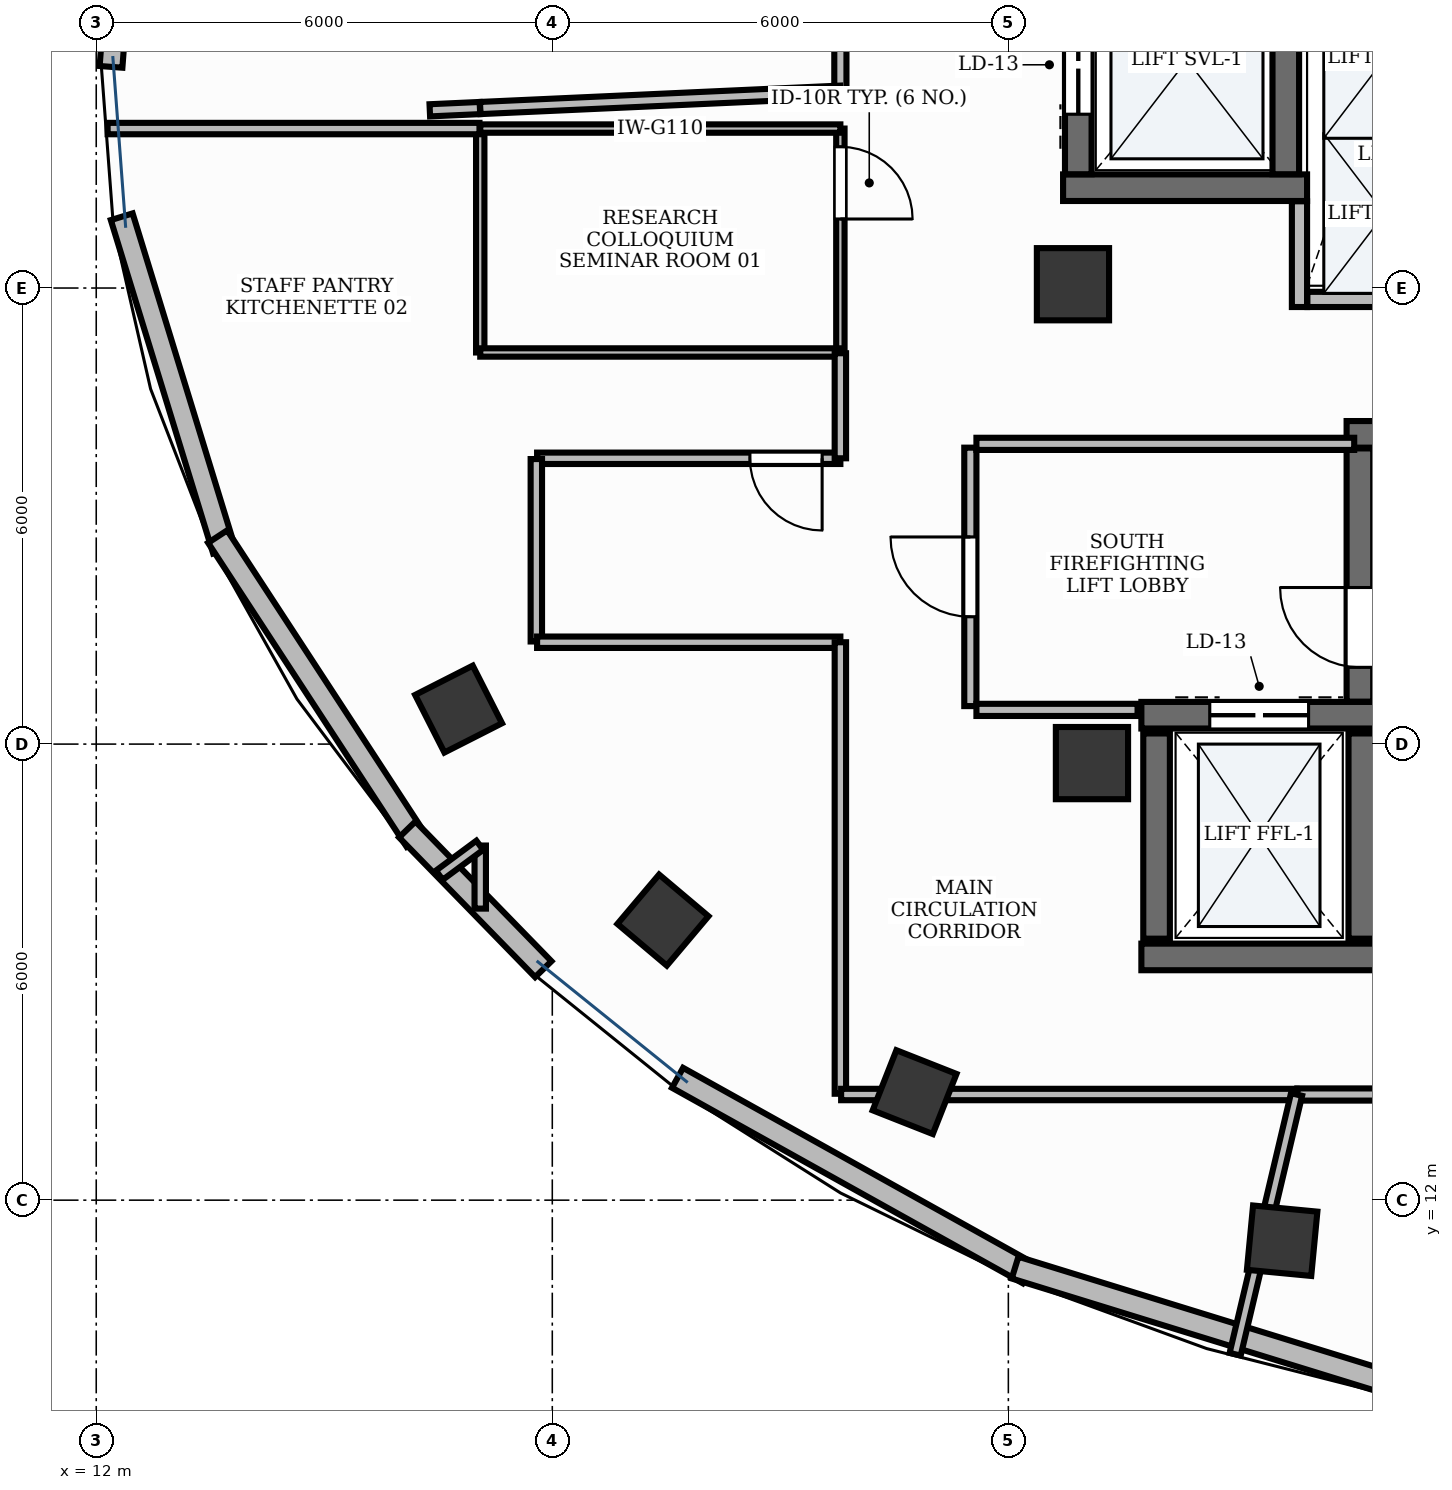
"""IFC4 building model, lengths in metres.
Left out: names, types, materials, properties, quantities, classifications, styles, units other than length and angle.
Written with IfcOpenShell. Run it as: python <this file> out.ifc"""

import sys

from ifc_helpers import new_model, si_unit, direction, frame, frame_2d, origin, origin_2d, place, context, subcontext, project, spatial, rectangle, extrude, element, fill, save


model = new_model("IFC4")
c1 = context("Model", 3, precision=1e-05, world=origin(), true_north=direction((0.0, 1.0)))
c2 = subcontext(c1, "Body", "Model", "MODEL_VIEW")
j1 = project(units=[si_unit("LENGTHUNIT", "METRE"), si_unit("PLANEANGLEUNIT", "RADIAN")], contexts=[c1])
p1 = place(None, origin())
s1 = spatial("IfcSite", under=j1, at=p1, CompositionType="ELEMENT")
p2 = place(p1, origin())
s2 = spatial("IfcBuilding", under=s1, at=p2, CompositionType="ELEMENT")
p3 = place(p2, frame((0.0, 0.0, 310.2)))
s3 = spatial("IfcBuildingStorey", under=s2, at=p3, CompositionType="ELEMENT", Elevation=310.2)
p4 = place(p3, frame((28.45, 22.075, 0.0), z_axis=(0.0, 0.0, 1.0), x_axis=(1.0, 0.0, 0.0)))
e1 = element("IfcWall", 1, at=p4, inside=s3, PredefinedType="SHEAR", context=c2, shape_type="SweptSolid", body=[
    extrude(rectangle(XDim=8.55, YDim=0.35, at=frame_2d((4.275, 0.0))), origin(), (0.0, 0.0, 1.0), 3.9),
])
p5 = place(p3, frame((28.625, 18.557, 0.0), z_axis=(0.0, 0.0, 1.0), x_axis=(0.0, 1.0, 0.0)))
e2 = element("IfcWall", 2, at=p5, inside=s3, PredefinedType="SHEAR", context=c2, shape_type="SweptSolid", body=[
    extrude(rectangle(XDim=3.333, YDim=0.35, at=frame_2d((1.667, 0.0))), origin(), (0.0, 0.0, 1.0), 3.9),
])
p6 = place(p5, frame((0.453, 0.0, 0.0)))
e3 = element("IfcOpeningElement", 3, at=p6, cuts=e2, PredefinedType="OPENING", context=c2, shape_type="SweptSolid", body=[
    extrude(rectangle(XDim=1.05, YDim=2.15, at=frame_2d((0.525, 1.075))), frame((0.0, 0.19, 0.0), z_axis=(0.0, -1.0, 0.0), x_axis=(1.0, 0.0, 0.0)), (0.0, 0.0, 1.0), 0.38),
])
p7 = place(p3, frame((25.75, 15.2, 0.0), z_axis=(0.0, 0.0, 1.0), x_axis=(1.0, 0.0, 0.0)))
e4 = element("IfcWall", 4, at=p7, inside=s3, PredefinedType="SHEAR", context=c2, shape_type="SweptSolid", body=[
    extrude(rectangle(XDim=3.1, YDim=0.35, at=frame_2d((1.55, 0.0))), origin(), (0.0, 0.0, 1.0), 3.9),
])
p8 = place(p3, frame((25.75, 18.38, 0.0), z_axis=(0.0, 0.0, 1.0), x_axis=(1.0, 0.0, 0.0)))
e5 = element("IfcWall", 5, at=p8, inside=s3, PredefinedType="SHEAR", context=c2, shape_type="SweptSolid", body=[
    extrude(rectangle(XDim=3.1, YDim=0.35, at=frame_2d((1.55, 0.0))), origin(), (0.0, 0.0, 1.0), 3.9),
])
p9 = place(p8, frame((0.9, 0.0, 0.0)))
e6 = element("IfcOpeningElement", 6, at=p9, cuts=e5, PredefinedType="OPENING", context=c2, shape_type="SweptSolid", body=[
    extrude(rectangle(XDim=1.3, YDim=2.2, at=frame_2d((0.65, 1.1))), frame((0.0, 0.19, 0.0), z_axis=(0.0, -1.0, 0.0), x_axis=(1.0, 0.0, 0.0)), (0.0, 0.0, 1.0), 0.38),
])
for number, where, z_axis, x_axis in (
    (7, (25.95, 15.44, 0.0), (0.0, 0.0, 1.0), (0.0, 1.0, 0.0)),
    (8, (28.65, 15.44, 0.0), (0.0, 0.0, 1.0), (0.0, 1.0, 0.0)),
):
    element("IfcWall", number, at=place(p3, frame(where, z_axis=z_axis, x_axis=x_axis)), inside=s3, PredefinedType="SHEAR", context=c2, shape_type="SweptSolid", body=[
        extrude(rectangle(XDim=2.7, YDim=0.35, at=frame_2d((1.35, 0.0))), origin(), (0.0, 0.0, 1.0), 3.9),
    ])
p10 = place(p3, frame((24.72, 25.32, 0.0), z_axis=(0.0, 0.0, 1.0), x_axis=(1.0, 0.0, 0.0)))
e9 = element("IfcWall", 9, at=p10, inside=s3, PredefinedType="SHEAR", context=c2, shape_type="SweptSolid", body=[
    extrude(rectangle(XDim=3.21, YDim=0.35, at=frame_2d((1.605, 0.0))), origin(), (0.0, 0.0, 1.0), 3.9),
])
p11 = place(p3, frame((24.92, 25.497, 0.0), z_axis=(0.0, 0.0, 1.0), x_axis=(0.0, 1.0, 0.0)))
e10 = element("IfcWall", 10, at=p11, inside=s3, PredefinedType="SHEAR", context=c2, shape_type="SweptSolid", body=[
    extrude(rectangle(XDim=3.006, YDim=0.35, at=frame_2d((1.503, 0.0))), origin(), (0.0, 0.0, 1.0), 3.9),
])
p12 = place(p11, frame((0.79, 0.0, 0.0)))
e11 = element("IfcOpeningElement", 11, at=p12, cuts=e10, PredefinedType="OPENING", context=c2, shape_type="SweptSolid", body=[
    extrude(rectangle(XDim=1.3, YDim=2.2, at=frame_2d((0.65, 1.1))), frame((0.0, 0.19, 0.0), z_axis=(0.0, -1.0, 0.0), x_axis=(1.0, 0.0, 0.0)), (0.0, 0.0, 1.0), 0.38),
])
p13 = place(p3, frame((27.65, 25.497, 0.0), z_axis=(0.0, 0.0, 1.0), x_axis=(0.0, 1.0, 0.0)))
e12 = element("IfcWall", 12, at=p13, inside=s3, PredefinedType="SHEAR", context=c2, shape_type="SweptSolid", body=[
    extrude(rectangle(XDim=3.006, YDim=0.35, at=frame_2d((1.503, 0.0))), origin(), (0.0, 0.0, 1.0), 3.9),
])
for number, where, z_axis, x_axis in (
    (13, (24.85, 24.05, -0.0), (0.0, 0.0, 1.0), (1.0, 0.0, 0.0)),
    (14, (25.1, 17.75, -0.0), (0.0, 0.0, 1.0), (1.0, 0.0, 0.0)),
):
    element("IfcColumn", number, at=place(p3, frame(where, z_axis=z_axis, x_axis=x_axis)), inside=s3, PredefinedType="PILASTER", context=c2, shape_type="SweptSolid", body=[
        extrude(rectangle(XDim=0.95, YDim=0.95, at=origin_2d()), origin(), (0.0, 0.0, 1.0), 3.901),
    ])
for number, where, z_axis, x_axis in (
    (15, (16.767, 18.46, -0.0), (0.0, 0.0, 1.0), (-0.453, 0.891, 0.0)),
    (16, (19.456, 15.685, -0.0), (0.0, 0.0, 1.0), (-0.764, 0.645, 0.0)),
    (17, (22.766, 13.421, -0.0), (0.0, 0.0, 1.0), (-0.93, 0.367, 0.0)),
    (18, (27.602, 11.466, -0.0), (0.0, 0.0, 1.0), (-0.995, 0.095, 0.0)),
):
    element("IfcColumn", number, at=place(p3, frame(where, z_axis=z_axis, x_axis=x_axis)), inside=s3, PredefinedType="COLUMN", context=c2, shape_type="SweptSolid", body=[
        extrude(rectangle(XDim=0.85, YDim=0.85, at=origin_2d()), origin(), (0.0, 0.0, 1.0), 3.901),
    ])
p14 = place(p3, frame((12.371, 29.249, 0.0), z_axis=(0.0, 0.0, 1.0), x_axis=(-0.075040925575, -0.997180454827, 0.0)))
e19 = element("IfcWall", 19, at=p14, inside=s3, PredefinedType="STANDARD", context=c2, shape_type="SweptSolid", body=[
    extrude(rectangle(XDim=2.346, YDim=0.3, at=frame_2d((1.173, 0.0))), origin(), (0.0, 0.0, 1.0), 3.9),
])
p15 = place(p3, frame((12.335, 24.938, 0.0), z_axis=(0.0, 0.0, 1.0), x_axis=(0.293311854667, -0.956016817797, 0.0)))
e20 = element("IfcWall", 20, at=p15, inside=s3, PredefinedType="STANDARD", context=c2, shape_type="SweptSolid", body=[
    extrude(rectangle(XDim=4.589, YDim=0.3, at=frame_2d((2.294, 0.0))), origin(), (0.0, 0.0, 1.0), 3.9),
])
p16 = place(p3, frame((13.598, 20.73, 0.0), z_axis=(0.0, 0.0, 1.0), x_axis=(0.546723072071, -0.837313491152, 0.0)))
e21 = element("IfcWall", 21, at=p16, inside=s3, PredefinedType="STANDARD", context=c2, shape_type="SweptSolid", body=[
    extrude(rectangle(XDim=4.775, YDim=0.3, at=frame_2d((2.388, 0.0))), origin(), (0.0, 0.0, 1.0), 3.9),
])
p17 = place(p3, frame((16.092, 16.877, 0.0), z_axis=(0.0, 0.0, 1.0), x_axis=(0.697621825822, -0.716466180735, 0.0)))
e22 = element("IfcWall", 22, at=p17, inside=s3, PredefinedType="STANDARD", context=c2, shape_type="SweptSolid", body=[
    extrude(rectangle(XDim=2.565, YDim=0.3, at=frame_2d((1.283, 0.0))), origin(), (0.0, 0.0, 1.0), 3.9),
])
p18 = place(p3, frame((19.648, 13.61, 0.0), z_axis=(0.0, 0.0, 1.0), x_axis=(0.87350676692, -0.486812004932, 0.0)))
e23 = element("IfcWall", 23, at=p18, inside=s3, PredefinedType="STANDARD", context=c2, shape_type="SweptSolid", body=[
    extrude(rectangle(XDim=5.282, YDim=0.3, at=frame_2d((2.641, 0.0))), origin(), (0.0, 0.0, 1.0), 3.9),
])
p19 = place(p3, frame((24.088, 11.113, 0.0), z_axis=(0.0, 0.0, 1.0), x_axis=(0.955535200816, -0.29487705913, 0.0)))
e24 = element("IfcWall", 24, at=p19, inside=s3, PredefinedType="STANDARD", context=c2, shape_type="SweptSolid", body=[
    extrude(rectangle(XDim=5.485, YDim=0.3, at=frame_2d((2.743, 0.0))), origin(), (0.0, 0.0, 1.0), 3.9),
])
p20 = place(p3, frame((27.83, 23.75, 0.0), z_axis=(0.0, 0.0, 1.0), x_axis=(0.0, 1.0, 0.0)))
e25 = element("IfcWall", 25, at=p20, inside=s3, PredefinedType="PARTITIONING", context=c2, shape_type="SweptSolid", body=[
    extrude(rectangle(XDim=1.391, YDim=0.2, at=frame_2d((0.696, 0.0))), origin(), (0.0, 0.0, 1.0), 2.91),
])
p21 = place(p3, frame((27.934, 23.85, 0.0), z_axis=(0.0, 0.0, 1.0), x_axis=(1.0, 0.0, 0.0)))
e26 = element("IfcWall", 26, at=p21, inside=s3, PredefinedType="PARTITIONING", context=c2, shape_type="SweptSolid", body=[
    extrude(rectangle(XDim=2.096, YDim=0.2, at=frame_2d((1.048, 0.0))), origin(), (0.0, 0.0, 1.0), 2.91),
])
p22 = place(p3, frame((23.5, 18.5, 0.0), z_axis=(0.0, 0.0, 1.0), x_axis=(0.0, 1.0, 0.0)))
e27 = element("IfcWall", 27, at=p22, inside=s3, PredefinedType="PARTITIONING", context=c2, shape_type="SweptSolid", body=[
    extrude(rectangle(XDim=3.4, YDim=0.16, at=frame_2d((1.7, 0.0))), origin(), (0.0, 0.0, 1.0), 2.91),
])
p23 = place(p22, frame((1.175, 0.0, 0.0)))
e28 = element("IfcOpeningElement", 28, at=p23, cuts=e27, PredefinedType="OPENING", context=c2, shape_type="SweptSolid", body=[
    extrude(rectangle(XDim=1.05, YDim=2.15, at=frame_2d((0.525, 1.075))), frame((0.0, 0.095, 0.0), z_axis=(0.0, -1.0, 0.0), x_axis=(1.0, 0.0, 0.0)), (0.0, 0.0, 1.0), 0.19),
])
p24 = place(p3, frame((23.58, 21.95, 0.0), z_axis=(0.0, 0.0, 1.0), x_axis=(1.0, 0.0, 0.0)))
e29 = element("IfcWall", 29, at=p24, inside=s3, PredefinedType="PARTITIONING", context=c2, shape_type="SweptSolid", body=[
    extrude(rectangle(XDim=4.97, YDim=0.16, at=frame_2d((2.485, 0.0))), origin(), (0.0, 0.0, 1.0), 2.91),
])
p25 = place(p3, frame((23.58, 18.45, 0.0), z_axis=(0.0, 0.0, 1.0), x_axis=(1.0, 0.0, 0.0)))
e30 = element("IfcWall", 30, at=p25, inside=s3, PredefinedType="PARTITIONING", context=c2, shape_type="SweptSolid", body=[
    extrude(rectangle(XDim=2.12, YDim=0.16, at=frame_2d((1.06, 0.0))), origin(), (0.0, 0.0, 1.0), 2.91),
])
p26 = place(p3, frame((21.79, 26.098, 0.0), z_axis=(0.0, 0.0, 1.0), x_axis=(0.0, -1.0, 0.0)))
e31 = element("IfcWall", 31, at=p26, inside=s3, PredefinedType="MOVABLE", context=c2, shape_type="SweptSolid", body=[
    extrude(rectangle(XDim=2.946, YDim=0.11, at=frame_2d((1.473, 0.0))), origin(), (0.0, 0.0, 1.0), 2.91),
])
p27 = place(p26, frame((0.24, 0.0, 0.0)))
e32 = element("IfcOpeningElement", 32, at=p27, cuts=e31, PredefinedType="OPENING", context=c2, shape_type="SweptSolid", body=[
    extrude(rectangle(XDim=0.95, YDim=2.15, at=frame_2d((0.475, 1.075))), frame((0.0, 0.07, 0.0), z_axis=(0.0, -1.0, 0.0), x_axis=(1.0, 0.0, 0.0)), (0.0, 0.0, 1.0), 0.14),
])
p28 = place(p3, frame((21.79, 21.76, 0.0), z_axis=(0.0, 0.0, 1.0), x_axis=(-1.0, 0.0, 0.0)))
e33 = element("IfcWall", 33, at=p28, inside=s3, PredefinedType="PARTITIONING", context=c2, shape_type="SweptSolid", body=[
    extrude(rectangle(XDim=3.99, YDim=0.15, at=frame_2d((1.995, 0.0))), origin(), (0.0, 0.0, 1.0), 2.91),
])
p29 = place(p28, frame((0.24, 0.0, 0.0)))
e34 = element("IfcOpeningElement", 34, at=p29, cuts=e33, PredefinedType="OPENING", context=c2, shape_type="SweptSolid", body=[
    extrude(rectangle(XDim=0.95, YDim=2.15, at=frame_2d((0.475, 1.075))), frame((0.0, 0.09, 0.0), z_axis=(0.0, -1.0, 0.0), x_axis=(1.0, 0.0, 0.0)), (0.0, 0.0, 1.0), 0.18),
])
p30 = place(p3, frame((27.802, 13.39, 0.0), z_axis=(0.0, 0.0, 1.0), x_axis=(1.0, 0.0, 0.0)))
e35 = element("IfcWall", 35, at=p30, inside=s3, PredefinedType="PARTITIONING", context=c2, shape_type="SweptSolid", body=[
    extrude(rectangle(XDim=11.598, YDim=0.16, at=frame_2d((5.799, 0.0))), origin(), (0.0, 0.0, 1.0), 2.91),
])
p31 = place(p30, frame((3.034, 0.0, 0.0)))
e36 = element("IfcOpeningElement", 36, at=p31, cuts=e35, PredefinedType="OPENING", context=c2, shape_type="SweptSolid", body=[
    extrude(rectangle(XDim=0.95, YDim=2.15, at=frame_2d((0.475, 1.075))), frame((0.0, 0.095, 0.0), z_axis=(0.0, -1.0, 0.0), x_axis=(1.0, 0.0, 0.0)), (0.0, 0.0, 1.0), 0.19),
])
p32 = place(p3, frame((17.052, 23.152, 0.0), z_axis=(0.0, 0.0, 1.0), x_axis=(0.0, 1.0, 0.0)))
e37 = element("IfcWall", 37, at=p32, inside=s3, PredefinedType="MOVABLE", context=c2, shape_type="SweptSolid", body=[
    extrude(rectangle(XDim=2.946, YDim=0.11, at=frame_2d((1.473, 0.0))), origin(), (0.0, 0.0, 1.0), 2.91),
])
for number, where, z_axis, x_axis in (
    (38, (17.052, 26.098, 0.0), (0.0, 0.0, 1.0), (1.0, 0.0, 0.0)),
    (39, (21.79, 23.152, 0.0), (0.0, 0.0, 1.0), (-1.0, 0.0, 0.0)),
):
    element("IfcWall", number, at=place(p3, frame(where, z_axis=z_axis, x_axis=x_axis)), inside=s3, PredefinedType="MOVABLE", context=c2, shape_type="SweptSolid", body=[
        extrude(rectangle(XDim=4.738, YDim=0.11, at=frame_2d((2.369, 0.0))), origin(), (0.0, 0.0, 1.0), 2.91),
    ])
p33 = place(p3, frame((12.15, 26.098, 0.0), z_axis=(0.0, 0.0, 1.0), x_axis=(1.0, 0.0, 0.0)))
e40 = element("IfcWall", 40, at=p33, inside=s3, PredefinedType="PARTITIONING", context=c2, shape_type="SweptSolid", body=[
    extrude(rectangle(XDim=4.892, YDim=0.15, at=frame_2d((2.446, 0.0))), origin(), (0.0, 0.0, 1.0), 2.91),
])
p34 = place(p3, frame((21.79, 23.142, 0.0), z_axis=(0.0, 0.0, 1.0), x_axis=(0.0, -1.0, 0.0)))
e41 = element("IfcWall", 41, at=p34, inside=s3, PredefinedType="PARTITIONING", context=c2, shape_type="SweptSolid", body=[
    extrude(rectangle(XDim=1.382, YDim=0.15, at=frame_2d((0.691, 0.0))), origin(), (0.0, 0.0, 1.0), 2.91),
])
p35 = place(p3, frame((17.79, 21.75, 0.0), z_axis=(0.0, 0.0, 1.0), x_axis=(0.0, -1.0, 0.0)))
e42 = element("IfcWall", 42, at=p35, inside=s3, PredefinedType="PARTITIONING", context=c2, shape_type="SweptSolid", body=[
    extrude(rectangle(XDim=2.4, YDim=0.15, at=frame_2d((1.2, 0.0))), origin(), (0.0, 0.0, 1.0), 2.91),
])
p36 = place(p3, frame((17.8, 19.34, 0.0), z_axis=(0.0, 0.0, 1.0), x_axis=(1.0, 0.0, 0.0)))
e43 = element("IfcWall", 43, at=p36, inside=s3, PredefinedType="PARTITIONING", context=c2, shape_type="SweptSolid", body=[
    extrude(rectangle(XDim=3.99, YDim=0.15, at=frame_2d((1.995, 0.0))), origin(), (0.0, 0.0, 1.0), 2.91),
])
p37 = place(p3, frame((21.79, 19.34, 0.0), z_axis=(0.0, 0.0, 1.0), x_axis=(0.0, -1.0, 0.0)))
e44 = element("IfcWall", 44, at=p37, inside=s3, PredefinedType="PARTITIONING", context=c2, shape_type="SweptSolid", body=[
    extrude(rectangle(XDim=5.94, YDim=0.15, at=frame_2d((2.97, 0.0))), origin(), (0.0, 0.0, 1.0), 2.91),
])
p38 = place(p3, frame((21.8, 13.39, 0.0), z_axis=(0.0, 0.0, 1.0), x_axis=(1.0, 0.0, 0.0)))
e45 = element("IfcWall", 45, at=p38, inside=s3, PredefinedType="PARTITIONING", context=c2, shape_type="SweptSolid", body=[
    extrude(rectangle(XDim=5.991, YDim=0.15, at=frame_2d((2.996, 0.0))), origin(), (0.0, 0.0, 1.0), 2.91),
])
p39 = place(p3, frame((27.792, 13.39, 0.0), z_axis=(0.0, 0.0, 1.0), x_axis=(-0.230015875141, -0.973186876804, 0.0)))
e46 = element("IfcWall", 46, at=p39, inside=s3, PredefinedType="PARTITIONING", context=c2, shape_type="SweptSolid", body=[
    extrude(rectangle(XDim=3.511, YDim=0.15, at=frame_2d((1.756, 0.0))), origin(), (0.0, 0.0, 1.0), 2.91),
])
p40 = place(p3, frame((17.052, 15.836, 0.0), z_axis=(0.0, 0.0, 1.0), x_axis=(0.0, 1.0, 0.0)))
e47 = element("IfcWall", 47, at=p40, inside=s3, PredefinedType="PARTITIONING", context=c2, shape_type="SweptSolid", body=[
    extrude(rectangle(XDim=0.83, YDim=0.15, at=frame_2d((0.415, 0.0))), origin(), (0.0, 0.0, 1.0), 2.91),
])
p41 = place(p3, frame((17.046, 16.669, 0.0), z_axis=(0.0, 0.0, 1.0), x_axis=(-0.803923041639, -0.594733337826, 0.0)))
e48 = element("IfcWall", 48, at=p41, inside=s3, PredefinedType="PARTITIONING", context=c2, shape_type="SweptSolid", body=[
    extrude(rectangle(XDim=0.662, YDim=0.15, at=frame_2d((0.331, 0.0))), origin(), (0.0, 0.0, 1.0), 2.91),
])
p42 = place(p3, frame((21.79, 27.59, 0.0), z_axis=(0.0, 0.0, 1.0), x_axis=(0.0, -1.0, 0.0)))
e49 = element("IfcWall", 49, at=p42, inside=s3, PredefinedType="PARTITIONING", context=c2, shape_type="SweptSolid", body=[
    extrude(rectangle(XDim=1.007, YDim=0.16, at=frame_2d((0.503, 0.0))), origin(), (0.0, 0.0, 1.0), 2.91),
])
p43 = place(p3, frame((21.79, 26.583, 0.0), z_axis=(0.0, 0.0, 1.0), x_axis=(-0.998971085975, -0.045351619434, 0.0)))
e50 = element("IfcWall", 50, at=p43, inside=s3, PredefinedType="PARTITIONING", context=c2, shape_type="SweptSolid", body=[
    extrude(rectangle(XDim=4.743, YDim=0.16, at=frame_2d((2.371, 0.0))), origin(), (0.0, 0.0, 1.0), 2.91),
])
p44 = place(p3, frame((17.048, 26.368, 0.0), z_axis=(0.0, 0.0, 1.0), x_axis=(-0.998964723802, -0.045491544253, 0.0)))
e51 = element("IfcWall", 51, at=p44, inside=s3, PredefinedType="PARTITIONING", context=c2, shape_type="SweptSolid", body=[
    extrude(rectangle(XDim=0.66, YDim=0.16, at=frame_2d((0.33, 0.0))), origin(), (0.0, 0.0, 1.0), 2.91),
])
p45 = place(p6, origin())
e52 = element("IfcDoor", 52, at=p45, inside=s3, OperationType="SINGLE_SWING_RIGHT", PredefinedType="DOOR", context=c2, shape_type="SweptSolid", body=[
    extrude(rectangle(XDim=1.05, YDim=2.15, at=frame_2d((0.525, 1.075))), frame((0.0, 0.025, 0.0), z_axis=(0.0, -1.0, 0.0), x_axis=(1.0, 0.0, 0.0)), (0.0, 0.0, 1.0), 0.05),
])
fill(e3, e52)
p46 = place(p9, origin())
e53 = element("IfcDoor", 53, at=p46, inside=s3, OperationType="DOUBLE_DOOR_SLIDING", PredefinedType="DOOR", context=c2, shape_type="SweptSolid", body=[
    extrude(rectangle(XDim=1.3, YDim=2.2, at=frame_2d((0.65, 1.1))), frame((0.0, 0.025, 0.0), z_axis=(0.0, -1.0, 0.0), x_axis=(1.0, 0.0, 0.0)), (0.0, 0.0, 1.0), 0.05),
])
fill(e6, e53)
p47 = place(p12, origin())
e54 = element("IfcDoor", 54, at=p47, inside=s3, OperationType="DOUBLE_DOOR_SLIDING", PredefinedType="DOOR", context=c2, shape_type="SweptSolid", body=[
    extrude(rectangle(XDim=1.3, YDim=2.2, at=frame_2d((0.65, 1.1))), frame((0.0, 0.025, 0.0), z_axis=(0.0, -1.0, 0.0), x_axis=(1.0, 0.0, 0.0)), (0.0, 0.0, 1.0), 0.05),
])
fill(e11, e54)
p48 = place(p23, origin())
e55 = element("IfcDoor", 55, at=p48, inside=s3, OperationType="SINGLE_SWING_RIGHT", PredefinedType="DOOR", context=c2, shape_type="SweptSolid", body=[
    extrude(rectangle(XDim=1.05, YDim=2.15, at=frame_2d((0.525, 1.075))), frame((0.0, 0.025, 0.0), z_axis=(0.0, -1.0, 0.0), x_axis=(1.0, 0.0, 0.0)), (0.0, 0.0, 1.0), 0.05),
])
fill(e28, e55)
p49 = place(p27, origin())
e56 = element("IfcDoor", 56, at=p49, inside=s3, OperationType="SINGLE_SWING_RIGHT", PredefinedType="DOOR", context=c2, shape_type="SweptSolid", body=[
    extrude(rectangle(XDim=0.95, YDim=2.15, at=frame_2d((0.475, 1.075))), frame((0.0, 0.025, 0.0), z_axis=(0.0, -1.0, 0.0), x_axis=(1.0, 0.0, 0.0)), (0.0, 0.0, 1.0), 0.05),
])
fill(e32, e56)
p50 = place(p29, origin())
e57 = element("IfcDoor", 57, at=p50, inside=s3, OperationType="SINGLE_SWING_LEFT", PredefinedType="DOOR", context=c2, shape_type="SweptSolid", body=[
    extrude(rectangle(XDim=0.95, YDim=2.15, at=frame_2d((0.475, 1.075))), frame((0.0, 0.025, 0.0), z_axis=(0.0, -1.0, 0.0), x_axis=(1.0, 0.0, 0.0)), (0.0, 0.0, 1.0), 0.05),
])
fill(e34, e57)
save(model, sys.argv[1])
